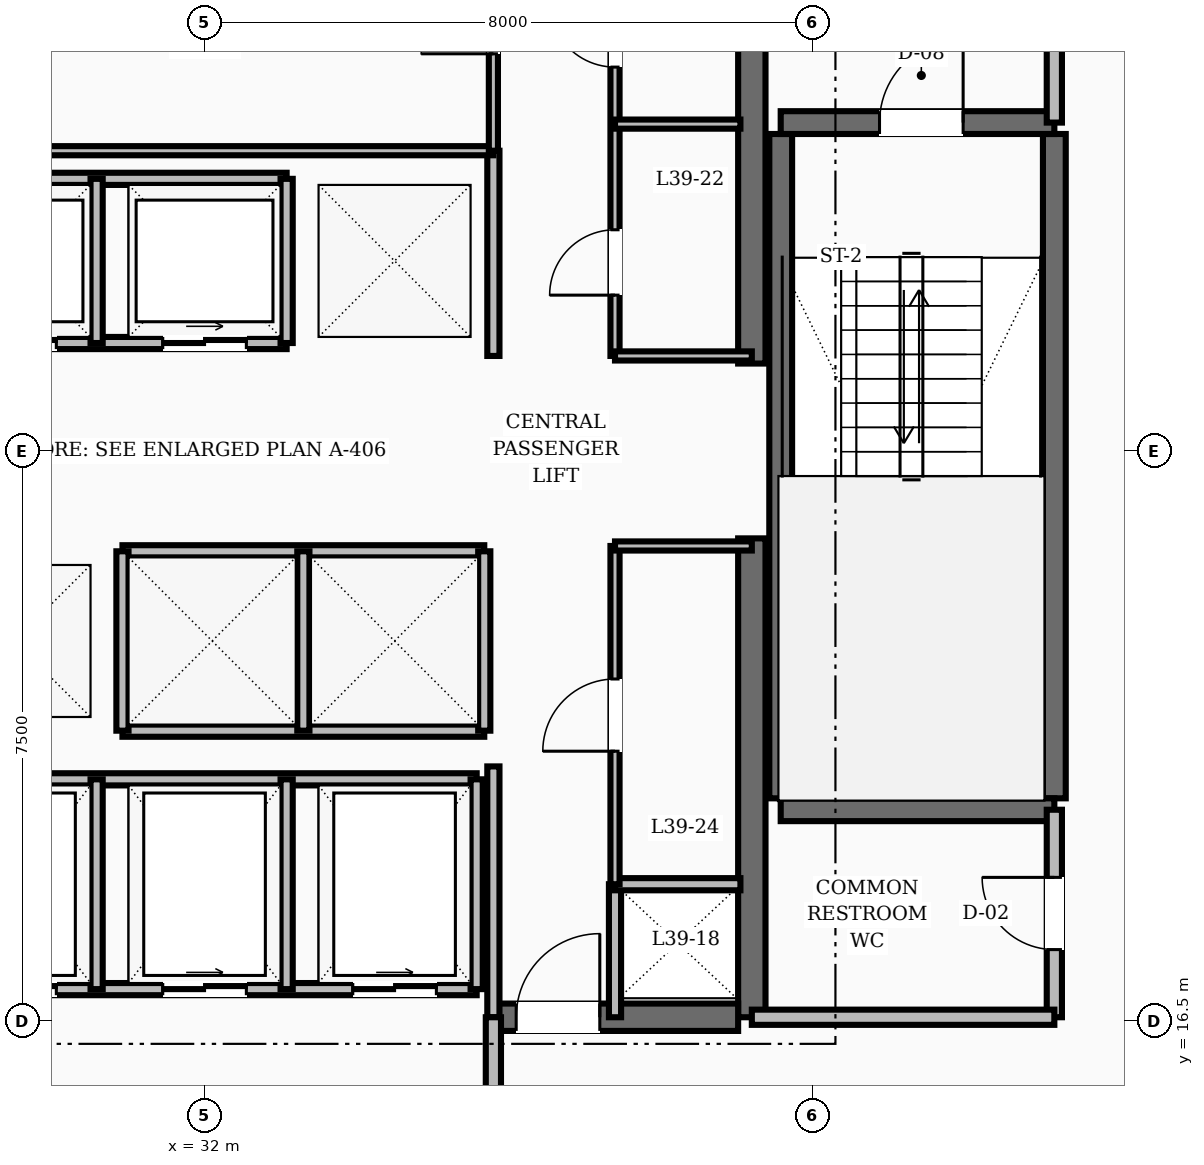
"""IFC4 building model, lengths in metres.
Left out: names, types, materials, properties, quantities, classifications, styles, units other than length and angle.
Written with IfcOpenShell. Run it as: python <this file> out.ifc"""

import sys

from ifc_helpers import new_model, si_unit, direction, frame, frame_2d, origin, place, context, subcontext, project, spatial, rectangle, extrude, element, fill, save


model = new_model("IFC4")
c1 = context("Model", 3, precision=1e-05, world=origin(), true_north=direction((0.0, 1.0)))
c2 = subcontext(c1, "Body", "Model", "MODEL_VIEW")
j1 = project(units=[si_unit("LENGTHUNIT", "METRE"), si_unit("PLANEANGLEUNIT", "RADIAN")], contexts=[c1])
p1 = place(None, origin())
s1 = spatial("IfcSite", under=j1, at=p1, CompositionType="ELEMENT")
p2 = place(p1, origin())
s2 = spatial("IfcBuilding", under=s1, at=p2, CompositionType="ELEMENT")
p3 = place(p2, frame((0.0, 0.0, 153.2)))
s3 = spatial("IfcBuildingStorey", under=s2, at=p3, CompositionType="ELEMENT", Elevation=153.2)
for number, where, z_axis, x_axis in (
    (1, (39.2, 16.55, 0.0), (0.0, 0.0, 1.0), (0.0, 1.0, 0.0)),
    (2, (39.2, 25.15, 0.0), (0.0, 0.0, 1.0), (0.0, 1.0, 0.0)),
):
    element("IfcWall", number, at=place(p3, frame(where, z_axis=z_axis, x_axis=x_axis)), inside=s3, PredefinedType="SHEAR", context=c2, shape_type="SweptSolid", body=[
        extrude(rectangle(XDim=6.3, YDim=0.36, at=frame_2d((3.15, 0.0))), origin(), (0.0, 0.0, 1.0), 3.6),
    ])
p4 = place(p3, frame((35.8, 16.55, 0.0), z_axis=(0.0, 0.0, 1.0), x_axis=(1.0, 0.0, 0.0)))
e3 = element("IfcWall", 3, at=p4, inside=s3, PredefinedType="SHEAR", context=c2, shape_type="SweptSolid", body=[
    extrude(rectangle(XDim=3.22, YDim=0.36, at=frame_2d((1.61, 0.0))), origin(), (0.0, 0.0, 1.0), 3.6),
])
p5 = place(p4, frame((0.3, 0.0, 0.0)))
e4 = element("IfcOpeningElement", 4, at=p5, cuts=e3, PredefinedType="OPENING", context=c2, shape_type="SweptSolid", body=[
    extrude(rectangle(XDim=1.1, YDim=2.1, at=frame_2d((0.55, 1.05))), frame((0.0, 0.19, 0.0), z_axis=(0.0, -1.0, 0.0), x_axis=(1.0, 0.0, 0.0)), (0.0, 0.0, 1.0), 0.38),
])
for number, where, z_axis, x_axis in (
    (5, (43.18, 19.43, 0.0), (0.0, 0.0, 1.0), (0.0, 1.0, 0.0)),
    (6, (39.58, 19.43, 0.0), (0.0, 0.0, 1.0), (0.0, 1.0, 0.0)),
):
    element("IfcWall", number, at=place(p3, frame(where, z_axis=z_axis, x_axis=x_axis)), inside=s3, PredefinedType="SHEAR", context=c2, shape_type="SweptSolid", body=[
        extrude(rectangle(XDim=8.74, YDim=0.3, at=frame_2d((4.37, 0.0))), origin(), (0.0, 0.0, 1.0), 3.6),
    ])
p6 = place(p3, frame((39.58, 19.28, 0.0), z_axis=(0.0, 0.0, 1.0), x_axis=(1.0, 0.0, 0.0)))
e7 = element("IfcWall", 7, at=p6, inside=s3, PredefinedType="SHEAR", context=c2, shape_type="SweptSolid", body=[
    extrude(rectangle(XDim=3.6, YDim=0.3, at=frame_2d((1.8, 0.0))), origin(), (0.0, 0.0, 1.0), 3.6),
])
p7 = place(p3, frame((39.58, 28.32, 0.0), z_axis=(0.0, 0.0, 1.0), x_axis=(1.0, 0.0, 0.0)))
e8 = element("IfcWall", 8, at=p7, inside=s3, PredefinedType="SHEAR", context=c2, shape_type="SweptSolid", body=[
    extrude(rectangle(XDim=3.6, YDim=0.3, at=frame_2d((1.8, 0.0))), origin(), (0.0, 0.0, 1.0), 3.6),
])
p8 = place(p7, frame((1.3, 0.0, 0.0)))
e9 = element("IfcOpeningElement", 9, at=p8, cuts=e8, PredefinedType="OPENING", context=c2, shape_type="SweptSolid", body=[
    extrude(rectangle(XDim=1.1, YDim=2.1, at=frame_2d((0.55, 1.05))), frame((0.0, 0.16, 0.0), z_axis=(0.0, -1.0, 0.0), x_axis=(1.0, 0.0, 0.0)), (0.0, 0.0, 1.0), 0.32),
])
p9 = place(p3, frame((43.18, 28.32, 0.0), z_axis=(0.0, 0.0, 1.0), x_axis=(0.0, 1.0, 0.0)))
e10 = element("IfcWall", 10, at=p9, inside=s3, PredefinedType="SOLIDWALL", context=c2, shape_type="SweptSolid", body=[
    extrude(rectangle(XDim=3.13, YDim=0.2, at=frame_2d((1.565, 0.0))), origin(), (0.0, 0.0, 1.0), 2.8),
])
p10 = place(p9, frame((1.015, 0.0, 0.0)))
e11 = element("IfcOpeningElement", 11, at=p10, cuts=e10, PredefinedType="OPENING", context=c2, shape_type="SweptSolid", body=[
    extrude(rectangle(XDim=1.1, YDim=2.1, at=frame_2d((0.55, 1.05))), frame((0.0, 0.11, 0.0), z_axis=(0.0, -1.0, 0.0), x_axis=(1.0, 0.0, 0.0)), (0.0, 0.0, 1.0), 0.22),
])
p11 = place(p3, frame((43.18, 16.55, 0.0), z_axis=(0.0, 0.0, 1.0), x_axis=(0.0, 1.0, 0.0)))
e12 = element("IfcWall", 12, at=p11, inside=s3, PredefinedType="SOLIDWALL", context=c2, shape_type="SweptSolid", body=[
    extrude(rectangle(XDim=2.73, YDim=0.2, at=frame_2d((1.365, 0.0))), origin(), (0.0, 0.0, 1.0), 2.8),
])
p12 = place(p11, frame((0.89, 0.0, 0.0)))
e13 = element("IfcOpeningElement", 13, at=p12, cuts=e12, PredefinedType="OPENING", context=c2, shape_type="SweptSolid", body=[
    extrude(rectangle(XDim=0.95, YDim=2.1, at=frame_2d((0.475, 1.05))), frame((0.0, 0.11, 0.0), z_axis=(0.0, -1.0, 0.0), x_axis=(1.0, 0.0, 0.0)), (0.0, 0.0, 1.0), 0.22),
])
p13 = place(p3, frame((39.2, 16.55, 0.0), z_axis=(0.0, 0.0, 1.0), x_axis=(1.0, 0.0, 0.0)))
e14 = element("IfcWall", 14, at=p13, inside=s3, PredefinedType="SOLIDWALL", context=c2, shape_type="SweptSolid", body=[
    extrude(rectangle(XDim=3.98, YDim=0.2, at=frame_2d((1.99, 0.0))), origin(), (0.0, 0.0, 1.0), 2.8),
])
p14 = place(p3, frame((35.8, 16.55, 0.0), z_axis=(0.0, 0.0, 1.0), x_axis=(0.0, 1.0, 0.0)))
e15 = element("IfcWall", 15, at=p14, inside=s3, PredefinedType="SOLIDWALL", context=c2, shape_type="SweptSolid", body=[
    extrude(rectangle(XDim=3.3, YDim=0.16, at=frame_2d((1.65, 0.0))), origin(), (0.0, 0.0, 1.0), 2.8),
])
p15 = place(p3, frame((37.4, 16.55, 0.0), z_axis=(0.0, 0.0, 1.0), x_axis=(0.0, 1.0, 0.0)))
e16 = element("IfcWall", 16, at=p15, inside=s3, PredefinedType="SOLIDWALL", context=c2, shape_type="SweptSolid", body=[
    extrude(rectangle(XDim=1.75, YDim=0.16, at=frame_2d((0.875, 0.0))), origin(), (0.0, 0.0, 1.0), 2.8),
])
p16 = place(p3, frame((35.8, 25.25, 0.0), z_axis=(0.0, 0.0, 1.0), x_axis=(0.0, 1.0, 0.0)))
e17 = element("IfcWall", 17, at=p16, inside=s3, PredefinedType="SOLIDWALL", context=c2, shape_type="SweptSolid", body=[
    extrude(rectangle(XDim=2.7, YDim=0.16, at=frame_2d((1.35, 0.0))), origin(), (0.0, 0.0, 1.0), 2.8),
])
p17 = place(p3, frame((35.8, 14.35, 0.0), z_axis=(0.0, 0.0, 1.0), x_axis=(0.0, 1.0, 0.0)))
e18 = element("IfcWall", 18, at=p17, inside=s3, PredefinedType="SOLIDWALL", context=c2, shape_type="SweptSolid", body=[
    extrude(rectangle(XDim=2.2, YDim=0.2, at=frame_2d((1.1, 0.0))), origin(), (0.0, 0.0, 1.0), 2.8),
])
p18 = place(p3, frame((28.42, 25.42, 0.0), z_axis=(0.0, 0.0, 1.0), x_axis=(1.0, 0.0, 0.0)))
e19 = element("IfcWall", 19, at=p18, inside=s3, PredefinedType="SOLIDWALL", context=c2, shape_type="SweptSolid", body=[
    extrude(rectangle(XDim=4.66, YDim=0.16, at=frame_2d((2.33, 0.0))), origin(), (0.0, 0.0, 1.0), 2.8),
])
p19 = place(p18, frame((0.53, 0.0, 0.0)))
e20 = element("IfcOpeningElement", 20, at=p19, cuts=e19, PredefinedType="OPENING", context=c2, shape_type="SweptSolid", body=[
    extrude(rectangle(XDim=1.1, YDim=2.15, at=frame_2d((0.55, 1.075))), frame((0.0, 0.09, 0.0), z_axis=(0.0, -1.0, 0.0), x_axis=(1.0, 0.0, 0.0)), (0.0, 0.0, 1.0), 0.18),
])
p20 = place(p18, frame((3.03, 0.0, 0.0)))
e21 = element("IfcOpeningElement", 21, at=p20, cuts=e19, PredefinedType="OPENING", context=c2, shape_type="SweptSolid", body=[
    extrude(rectangle(XDim=1.1, YDim=2.15, at=frame_2d((0.55, 1.075))), frame((0.0, 0.09, 0.0), z_axis=(0.0, -1.0, 0.0), x_axis=(1.0, 0.0, 0.0)), (0.0, 0.0, 1.0), 0.18),
])
p21 = place(p3, frame((28.42, 27.58, 0.0), z_axis=(0.0, 0.0, 1.0), x_axis=(1.0, 0.0, 0.0)))
e22 = element("IfcWall", 22, at=p21, inside=s3, PredefinedType="SOLIDWALL", context=c2, shape_type="SweptSolid", body=[
    extrude(rectangle(XDim=4.66, YDim=0.16, at=frame_2d((2.33, 0.0))), origin(), (0.0, 0.0, 1.0), 2.8),
])
for number, where, z_axis, x_axis in (
    (23, (30.58, 25.42, 0.0), (0.0, 0.0, 1.0), (0.0, 1.0, 0.0)),
    (24, (33.08, 25.42, 0.0), (0.0, 0.0, 1.0), (0.0, 1.0, 0.0)),
):
    element("IfcWall", number, at=place(p3, frame(where, z_axis=z_axis, x_axis=x_axis)), inside=s3, PredefinedType="SOLIDWALL", context=c2, shape_type="SweptSolid", body=[
        extrude(rectangle(XDim=2.16, YDim=0.16, at=frame_2d((1.08, 0.0))), origin(), (0.0, 0.0, 1.0), 2.8),
    ])
for number, where, z_axis, x_axis in (
    (25, (30.92, 22.68, 0.0), (0.0, 0.0, 1.0), (1.0, 0.0, 0.0)),
    (26, (30.92, 20.32, 0.0), (0.0, 0.0, 1.0), (1.0, 0.0, 0.0)),
):
    element("IfcWall", number, at=place(p3, frame(where, z_axis=z_axis, x_axis=x_axis)), inside=s3, PredefinedType="SOLIDWALL", context=c2, shape_type="SweptSolid", body=[
        extrude(rectangle(XDim=4.76, YDim=0.16, at=frame_2d((2.38, 0.0))), origin(), (0.0, 0.0, 1.0), 2.8),
    ])
for number, where, z_axis, x_axis in (
    (27, (30.92, 20.32, 0.0), (0.0, 0.0, 1.0), (0.0, 1.0, 0.0)),
    (28, (33.3, 20.32, 0.0), (0.0, 0.0, 1.0), (0.0, 1.0, 0.0)),
    (29, (35.68, 20.32, 0.0), (0.0, 0.0, 1.0), (0.0, 1.0, 0.0)),
):
    element("IfcWall", number, at=place(p3, frame(where, z_axis=z_axis, x_axis=x_axis)), inside=s3, PredefinedType="SOLIDWALL", context=c2, shape_type="SweptSolid", body=[
        extrude(rectangle(XDim=2.36, YDim=0.16, at=frame_2d((1.18, 0.0))), origin(), (0.0, 0.0, 1.0), 2.8),
    ])
p22 = place(p3, frame((28.42, 16.92, 0.0), z_axis=(0.0, 0.0, 1.0), x_axis=(1.0, 0.0, 0.0)))
e30 = element("IfcWall", 30, at=p22, inside=s3, PredefinedType="SOLIDWALL", context=c2, shape_type="SweptSolid", body=[
    extrude(rectangle(XDim=7.16, YDim=0.16, at=frame_2d((3.58, 0.0))), origin(), (0.0, 0.0, 1.0), 2.8),
])
p23 = place(p22, frame((0.53, 0.0, 0.0)))
e31 = element("IfcOpeningElement", 31, at=p23, cuts=e30, PredefinedType="OPENING", context=c2, shape_type="SweptSolid", body=[
    extrude(rectangle(XDim=1.1, YDim=2.15, at=frame_2d((0.55, 1.075))), frame((0.0, 0.09, 0.0), z_axis=(0.0, -1.0, 0.0), x_axis=(1.0, 0.0, 0.0)), (0.0, 0.0, 1.0), 0.18),
])
p24 = place(p22, frame((3.03, 0.0, 0.0)))
e32 = element("IfcOpeningElement", 32, at=p24, cuts=e30, PredefinedType="OPENING", context=c2, shape_type="SweptSolid", body=[
    extrude(rectangle(XDim=1.1, YDim=2.15, at=frame_2d((0.55, 1.075))), frame((0.0, 0.09, 0.0), z_axis=(0.0, -1.0, 0.0), x_axis=(1.0, 0.0, 0.0)), (0.0, 0.0, 1.0), 0.18),
])
p25 = place(p22, frame((5.53, 0.0, 0.0)))
e33 = element("IfcOpeningElement", 33, at=p25, cuts=e30, PredefinedType="OPENING", context=c2, shape_type="SweptSolid", body=[
    extrude(rectangle(XDim=1.1, YDim=2.15, at=frame_2d((0.55, 1.075))), frame((0.0, 0.09, 0.0), z_axis=(0.0, -1.0, 0.0), x_axis=(1.0, 0.0, 0.0)), (0.0, 0.0, 1.0), 0.18),
])
p26 = place(p3, frame((28.42, 19.68, 0.0), z_axis=(0.0, 0.0, 1.0), x_axis=(1.0, 0.0, 0.0)))
e34 = element("IfcWall", 34, at=p26, inside=s3, PredefinedType="SOLIDWALL", context=c2, shape_type="SweptSolid", body=[
    extrude(rectangle(XDim=7.16, YDim=0.16, at=frame_2d((3.58, 0.0))), origin(), (0.0, 0.0, 1.0), 2.8),
])
for number, where, z_axis, x_axis in (
    (35, (30.58, 16.92, 0.0), (0.0, 0.0, 1.0), (0.0, 1.0, 0.0)),
    (36, (33.08, 16.92, 0.0), (0.0, 0.0, 1.0), (0.0, 1.0, 0.0)),
    (37, (35.58, 16.92, 0.0), (0.0, 0.0, 1.0), (0.0, 1.0, 0.0)),
):
    element("IfcWall", number, at=place(p3, frame(where, z_axis=z_axis, x_axis=x_axis)), inside=s3, PredefinedType="SOLIDWALL", context=c2, shape_type="SweptSolid", body=[
        extrude(rectangle(XDim=2.76, YDim=0.16, at=frame_2d((1.38, 0.0))), origin(), (0.0, 0.0, 1.0), 2.8),
    ])
p27 = place(p3, frame((28.2, 27.95, 0.0), z_axis=(0.0, 0.0, 1.0), x_axis=(1.0, 0.0, 0.0)))
e38 = element("IfcWall", 38, at=p27, inside=s3, PredefinedType="PARTITIONING", context=c2, shape_type="SweptSolid", body=[
    extrude(rectangle(XDim=7.6, YDim=0.12, at=frame_2d((3.8, 0.0))), origin(), (0.0, 0.0, 1.0), 2.8),
])
p28 = place(p3, frame((35.8, 27.95, 0.0), z_axis=(0.0, 0.0, 1.0), x_axis=(0.0, 1.0, 0.0)))
e39 = element("IfcWall", 39, at=p28, inside=s3, PredefinedType="PARTITIONING", context=c2, shape_type="SweptSolid", body=[
    extrude(rectangle(XDim=3.5, YDim=0.12, at=frame_2d((1.75, 0.0))), origin(), (0.0, 0.0, 1.0), 2.8),
])
p29 = place(p28, frame((1.275, 0.0, 0.0)))
e40 = element("IfcOpeningElement", 40, at=p29, cuts=e39, PredefinedType="OPENING", context=c2, shape_type="SweptSolid", body=[
    extrude(rectangle(XDim=0.95, YDim=2.1, at=frame_2d((0.475, 1.05))), frame((0.0, 0.07, 0.0), z_axis=(0.0, -1.0, 0.0), x_axis=(1.0, 0.0, 0.0)), (0.0, 0.0, 1.0), 0.14),
])
p30 = place(p3, frame((37.4, 18.3, 0.0), z_axis=(0.0, 0.0, 1.0), x_axis=(1.0, 0.0, 0.0)))
e41 = element("IfcWall", 41, at=p30, inside=s3, PredefinedType="SOLIDWALL", context=c2, shape_type="SweptSolid", body=[
    extrude(rectangle(XDim=1.65, YDim=0.16, at=frame_2d((0.825, 0.0))), origin(), (0.0, 0.0, 1.0), 2.8),
])
p31 = place(p3, frame((37.4, 25.25, 0.0), z_axis=(0.0, 0.0, 1.0), x_axis=(0.0, 1.0, 0.0)))
e42 = element("IfcWall", 42, at=p31, inside=s3, PredefinedType="PARTITIONING", context=c2, shape_type="SweptSolid", body=[
    extrude(rectangle(XDim=6.2, YDim=0.12, at=frame_2d((3.1, 0.0))), origin(), (0.0, 0.0, 1.0), 2.8),
])
p32 = place(p31, frame((0.8, 0.0, 0.0)))
e43 = element("IfcOpeningElement", 43, at=p32, cuts=e42, PredefinedType="OPENING", context=c2, shape_type="SweptSolid", body=[
    extrude(rectangle(XDim=0.86, YDim=2.1, at=frame_2d((0.43, 1.05))), frame((0.0, 0.07, 0.0), z_axis=(0.0, -1.0, 0.0), x_axis=(1.0, 0.0, 0.0)), (0.0, 0.0, 1.0), 0.14),
])
p33 = place(p31, frame((3.8, 0.0, 0.0)))
e44 = element("IfcOpeningElement", 44, at=p33, cuts=e42, PredefinedType="OPENING", context=c2, shape_type="SweptSolid", body=[
    extrude(rectangle(XDim=0.86, YDim=2.1, at=frame_2d((0.43, 1.05))), frame((0.0, 0.07, 0.0), z_axis=(0.0, -1.0, 0.0), x_axis=(1.0, 0.0, 0.0)), (0.0, 0.0, 1.0), 0.14),
])
p34 = place(p3, frame((37.4, 25.25, 0.0), z_axis=(0.0, 0.0, 1.0), x_axis=(1.0, 0.0, 0.0)))
e45 = element("IfcWall", 45, at=p34, inside=s3, PredefinedType="PARTITIONING", context=c2, shape_type="SweptSolid", body=[
    extrude(rectangle(XDim=1.8, YDim=0.12, at=frame_2d((0.9, 0.0))), origin(), (0.0, 0.0, 1.0), 2.8),
])
p35 = place(p3, frame((37.4, 18.3, 0.0), z_axis=(0.0, 0.0, 1.0), x_axis=(0.0, 1.0, 0.0)))
e46 = element("IfcWall", 46, at=p35, inside=s3, PredefinedType="PARTITIONING", context=c2, shape_type="SweptSolid", body=[
    extrude(rectangle(XDim=4.45, YDim=0.12, at=frame_2d((2.225, 0.0))), origin(), (0.0, 0.0, 1.0), 2.8),
])
p36 = place(p35, frame((1.75, 0.0, 0.0)))
e47 = element("IfcOpeningElement", 47, at=p36, cuts=e46, PredefinedType="OPENING", context=c2, shape_type="SweptSolid", body=[
    extrude(rectangle(XDim=0.95, YDim=2.1, at=frame_2d((0.475, 1.05))), frame((0.0, 0.07, 0.0), z_axis=(0.0, -1.0, 0.0), x_axis=(1.0, 0.0, 0.0)), (0.0, 0.0, 1.0), 0.14),
])
p37 = place(p3, frame((37.4, 22.75, 0.0), z_axis=(0.0, 0.0, 1.0), x_axis=(1.0, 0.0, 0.0)))
e48 = element("IfcWall", 48, at=p37, inside=s3, PredefinedType="PARTITIONING", context=c2, shape_type="SweptSolid", body=[
    extrude(rectangle(XDim=1.8, YDim=0.12, at=frame_2d((0.9, 0.0))), origin(), (0.0, 0.0, 1.0), 2.8),
])
p38 = place(p3, frame((37.4, 28.3, 0.0), z_axis=(0.0, 0.0, 1.0), x_axis=(1.0, 0.0, 0.0)))
e49 = element("IfcWall", 49, at=p38, inside=s3, PredefinedType="PARTITIONING", context=c2, shape_type="SweptSolid", body=[
    extrude(rectangle(XDim=1.65, YDim=0.12, at=frame_2d((0.825, 0.0))), origin(), (0.0, 0.0, 1.0), 2.8),
])
p39 = place(p8, origin())
e50 = element("IfcDoor", 50, at=p39, inside=s3, OperationType="SINGLE_SWING_RIGHT", PredefinedType="DOOR", context=c2, shape_type="SweptSolid", body=[
    extrude(rectangle(XDim=1.1, YDim=2.1, at=frame_2d((0.55, 1.05))), frame((0.0, 0.025, 0.0), z_axis=(0.0, -1.0, 0.0), x_axis=(1.0, 0.0, 0.0)), (0.0, 0.0, 1.0), 0.05),
])
fill(e9, e50)
p40 = place(p12, origin())
e51 = element("IfcDoor", 51, at=p40, inside=s3, OperationType="SINGLE_SWING_RIGHT", PredefinedType="DOOR", context=c2, shape_type="SweptSolid", body=[
    extrude(rectangle(XDim=0.95, YDim=2.1, at=frame_2d((0.475, 1.05))), frame((0.0, 0.025, 0.0), z_axis=(0.0, -1.0, 0.0), x_axis=(1.0, 0.0, 0.0)), (0.0, 0.0, 1.0), 0.05),
])
fill(e13, e51)
p41 = place(p5, origin())
e52 = element("IfcDoor", 52, at=p41, inside=s3, OperationType="SINGLE_SWING_RIGHT", PredefinedType="DOOR", context=c2, shape_type="SweptSolid", body=[
    extrude(rectangle(XDim=1.1, YDim=2.1, at=frame_2d((0.55, 1.05))), frame((0.0, 0.025, 0.0), z_axis=(0.0, -1.0, 0.0), x_axis=(1.0, 0.0, 0.0)), (0.0, 0.0, 1.0), 0.05),
])
fill(e4, e52)
p42 = place(p19, origin())
e53 = element("IfcDoor", 53, at=p42, inside=s3, OperationType="SLIDING_TO_RIGHT", PredefinedType="DOOR", context=c2, shape_type="SweptSolid", body=[
    extrude(rectangle(XDim=1.1, YDim=2.15, at=frame_2d((0.55, 1.075))), frame((0.0, 0.025, 0.0), z_axis=(0.0, -1.0, 0.0), x_axis=(1.0, 0.0, 0.0)), (0.0, 0.0, 1.0), 0.05),
])
fill(e20, e53)
p43 = place(p20, origin())
e54 = element("IfcDoor", 54, at=p43, inside=s3, OperationType="SLIDING_TO_RIGHT", PredefinedType="DOOR", context=c2, shape_type="SweptSolid", body=[
    extrude(rectangle(XDim=1.1, YDim=2.15, at=frame_2d((0.55, 1.075))), frame((0.0, 0.025, 0.0), z_axis=(0.0, -1.0, 0.0), x_axis=(1.0, 0.0, 0.0)), (0.0, 0.0, 1.0), 0.05),
])
fill(e21, e54)
p44 = place(p23, origin())
e55 = element("IfcDoor", 55, at=p44, inside=s3, OperationType="SLIDING_TO_RIGHT", PredefinedType="DOOR", context=c2, shape_type="SweptSolid", body=[
    extrude(rectangle(XDim=1.1, YDim=2.15, at=frame_2d((0.55, 1.075))), frame((0.0, 0.025, 0.0), z_axis=(0.0, -1.0, 0.0), x_axis=(1.0, 0.0, 0.0)), (0.0, 0.0, 1.0), 0.05),
])
fill(e31, e55)
p45 = place(p24, origin())
e56 = element("IfcDoor", 56, at=p45, inside=s3, OperationType="SLIDING_TO_RIGHT", PredefinedType="DOOR", context=c2, shape_type="SweptSolid", body=[
    extrude(rectangle(XDim=1.1, YDim=2.15, at=frame_2d((0.55, 1.075))), frame((0.0, 0.025, 0.0), z_axis=(0.0, -1.0, 0.0), x_axis=(1.0, 0.0, 0.0)), (0.0, 0.0, 1.0), 0.05),
])
fill(e32, e56)
p46 = place(p25, origin())
e57 = element("IfcDoor", 57, at=p46, inside=s3, OperationType="SLIDING_TO_RIGHT", PredefinedType="DOOR", context=c2, shape_type="SweptSolid", body=[
    extrude(rectangle(XDim=1.1, YDim=2.15, at=frame_2d((0.55, 1.075))), frame((0.0, 0.025, 0.0), z_axis=(0.0, -1.0, 0.0), x_axis=(1.0, 0.0, 0.0)), (0.0, 0.0, 1.0), 0.05),
])
fill(e33, e57)
p47 = place(p29, origin())
e58 = element("IfcDoor", 58, at=p47, inside=s3, OperationType="SINGLE_SWING_LEFT", PredefinedType="DOOR", context=c2, shape_type="SweptSolid", body=[
    extrude(rectangle(XDim=0.95, YDim=2.1, at=frame_2d((0.475, 1.05))), frame((0.0, 0.025, 0.0), z_axis=(0.0, -1.0, 0.0), x_axis=(1.0, 0.0, 0.0)), (0.0, 0.0, 1.0), 0.05),
])
fill(e40, e58)
p48 = place(p32, origin())
e59 = element("IfcDoor", 59, at=p48, inside=s3, OperationType="SINGLE_SWING_LEFT", PredefinedType="DOOR", context=c2, shape_type="SweptSolid", body=[
    extrude(rectangle(XDim=0.86, YDim=2.1, at=frame_2d((0.43, 1.05))), frame((0.0, 0.025, 0.0), z_axis=(0.0, -1.0, 0.0), x_axis=(1.0, 0.0, 0.0)), (0.0, 0.0, 1.0), 0.05),
])
fill(e43, e59)
p49 = place(p33, origin())
e60 = element("IfcDoor", 60, at=p49, inside=s3, OperationType="SINGLE_SWING_RIGHT", PredefinedType="DOOR", context=c2, shape_type="SweptSolid", body=[
    extrude(rectangle(XDim=0.86, YDim=2.1, at=frame_2d((0.43, 1.05))), frame((0.0, 0.025, 0.0), z_axis=(0.0, -1.0, 0.0), x_axis=(1.0, 0.0, 0.0)), (0.0, 0.0, 1.0), 0.05),
])
fill(e44, e60)
p50 = place(p36, origin())
e61 = element("IfcDoor", 61, at=p50, inside=s3, OperationType="SINGLE_SWING_LEFT", PredefinedType="DOOR", context=c2, shape_type="SweptSolid", body=[
    extrude(rectangle(XDim=0.95, YDim=2.1, at=frame_2d((0.475, 1.05))), frame((0.0, 0.025, 0.0), z_axis=(0.0, -1.0, 0.0), x_axis=(1.0, 0.0, 0.0)), (0.0, 0.0, 1.0), 0.05),
])
fill(e47, e61)
save(model, sys.argv[1])
